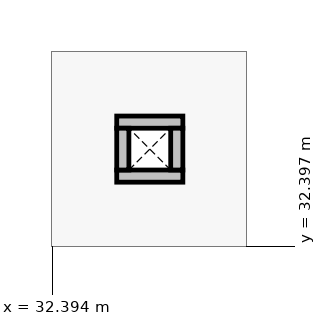
"""IFC4 building model, lengths in metres.
Left out: names, types, materials, properties, quantities, classifications, styles, units other than length and angle.
Written with IfcOpenShell. Run it as: python <this file> out.ifc"""

import sys

from ifc_helpers import new_model, si_unit, direction, frame, frame_2d, origin, place, context, subcontext, project, spatial, rectangle, extrude, element, save


model = new_model("IFC4")
c1 = context("Model", 3, precision=1e-05, world=origin(), true_north=direction((0.0, 1.0)))
c2 = subcontext(c1, "Body", "Model", "MODEL_VIEW")
j1 = project(units=[si_unit("LENGTHUNIT", "METRE"), si_unit("PLANEANGLEUNIT", "RADIAN")], contexts=[c1])
p1 = place(None, origin())
s1 = spatial("IfcSite", under=j1, at=p1, CompositionType="ELEMENT")
p2 = place(p1, origin())
s2 = spatial("IfcBuilding", under=s1, at=p2, CompositionType="ELEMENT")
p3 = place(p2, frame((0.0, 0.0, 4.8)))
s3 = spatial("IfcBuildingStorey", under=s2, at=p3, CompositionType="ELEMENT", Elevation=4.8)
for number, where, z_axis, x_axis in (
    (1, (33.24, 33.32, 0.0), (0.0, 0.0, 1.0), (1.0, 0.0, 0.0)),
    (2, (33.24, 34.03, 0.0), (0.0, 0.0, 1.0), (1.0, 0.0, 0.0)),
):
    element("IfcWall", number, at=place(p3, frame(where, z_axis=z_axis, x_axis=x_axis)), inside=s3, PredefinedType="PARTITIONING", context=c2, shape_type="SweptSolid", body=[
        extrude(rectangle(XDim=0.87, YDim=0.16, at=frame_2d((0.435, 0.0))), origin(), (0.0, 0.0, 1.0), 3.35),
    ])
for number, where, z_axis, x_axis in (
    (3, (33.32, 33.4, 0.0), (0.0, 0.0, 1.0), (0.0, 1.0, 0.0)),
    (4, (34.03, 33.4, 0.0), (0.0, 0.0, 1.0), (0.0, 1.0, 0.0)),
):
    element("IfcWall", number, at=place(p3, frame(where, z_axis=z_axis, x_axis=x_axis)), inside=s3, PredefinedType="PARTITIONING", context=c2, shape_type="SweptSolid", body=[
        extrude(rectangle(XDim=0.55, YDim=0.16, at=frame_2d((0.275, 0.0))), origin(), (0.0, 0.0, 1.0), 3.35),
    ])
save(model, sys.argv[1])
